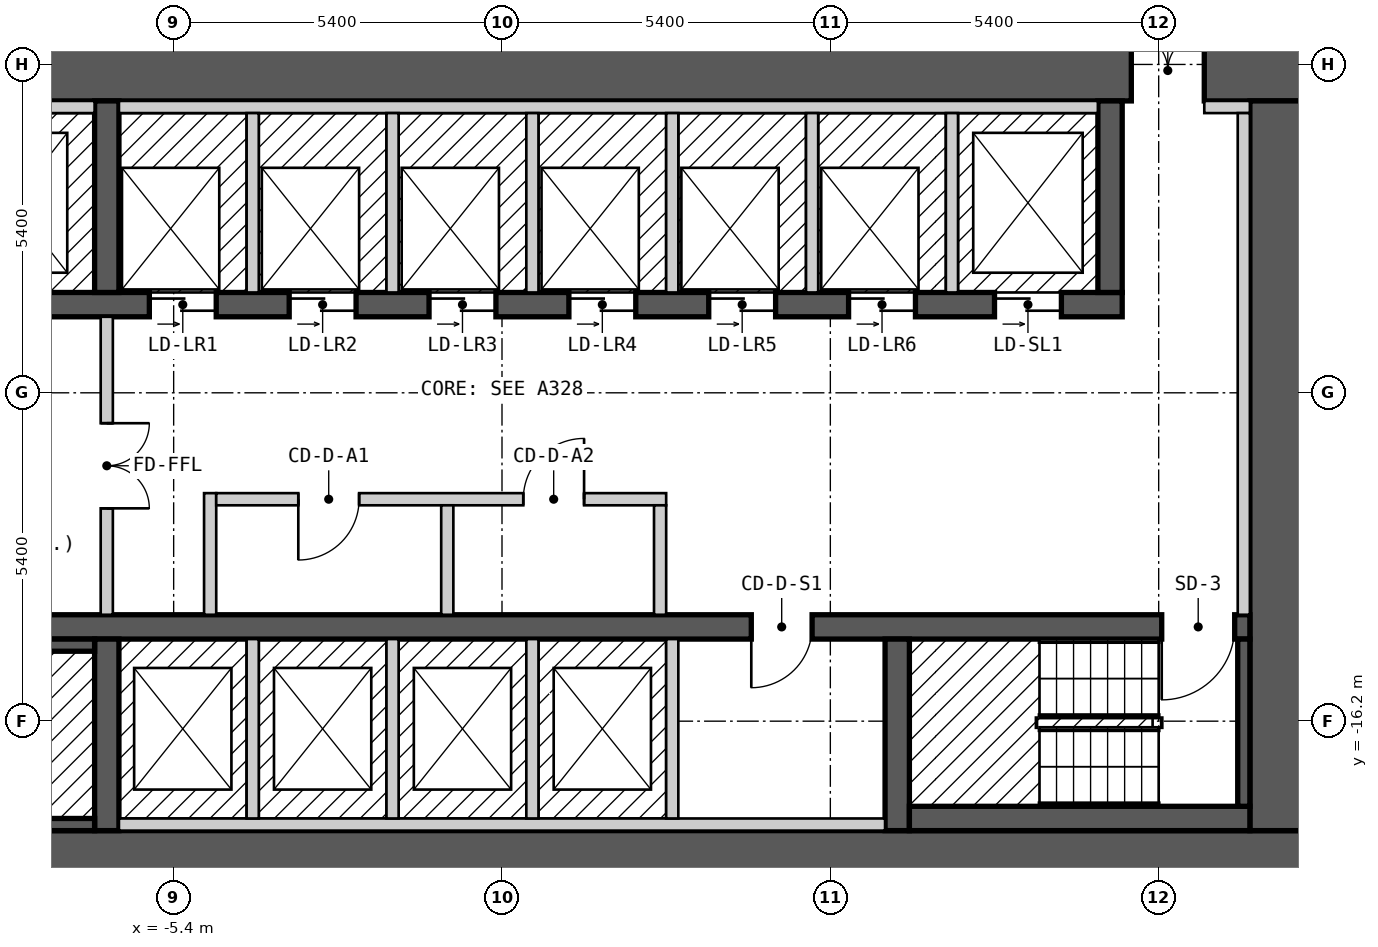
"""IFC4 building model, lengths in metres.
Left out: names, types, materials, properties, quantities, classifications, styles, units other than length and angle.
Written with IfcOpenShell. Run it as: python <this file> out.ifc"""

import sys

from ifc_helpers import new_model, si_unit, direction, frame, frame_2d, origin, place, context, subcontext, project, spatial, rectangle, extrude, element, fill, save


model = new_model("IFC4")
c1 = context("Model", 3, precision=1e-05, world=origin(), true_north=direction((0.0, 1.0)))
c2 = subcontext(c1, "Body", "Model", "MODEL_VIEW")
j1 = project(units=[si_unit("LENGTHUNIT", "METRE"), si_unit("PLANEANGLEUNIT", "RADIAN")], contexts=[c1])
p1 = place(None, origin())
s1 = spatial("IfcSite", under=j1, at=p1, CompositionType="ELEMENT")
p2 = place(p1, origin())
s2 = spatial("IfcBuilding", under=s1, at=p2, CompositionType="ELEMENT")
p3 = place(p2, frame((0.0, 0.0, 99.0)))
s3 = spatial("IfcBuildingStorey", under=s2, at=p3, CompositionType="ELEMENT", Elevation=99.0)
p4 = place(p3, frame((-13.3, -18.5, 0.0), z_axis=(0.0, 0.0, 1.0), x_axis=(1.0, 0.0, 0.0)))
e1 = element("IfcWall", 1, at=p4, inside=s3, PredefinedType="SHEAR", context=c2, shape_type="SweptSolid", body=[
    extrude(rectangle(XDim=26.6, YDim=1.0, at=frame_2d((13.3, 0.0))), origin(), (0.0, 0.0, 1.0), 2.7),
])
p5 = place(p3, frame((-13.3, -5.5, 0.0), z_axis=(0.0, 0.0, 1.0), x_axis=(1.0, 0.0, 0.0)))
e2 = element("IfcWall", 2, at=p5, inside=s3, PredefinedType="SHEAR", context=c2, shape_type="SweptSolid", body=[
    extrude(rectangle(XDim=26.6, YDim=1.0, at=frame_2d((13.3, 0.0))), origin(), (0.0, 0.0, 1.0), 2.7),
])
p6 = place(p5, frame((23.65, 0.0, 0.0)))
e3 = element("IfcOpeningElement", 3, at=p6, cuts=e2, PredefinedType="OPENING", context=c2, shape_type="SweptSolid", body=[
    extrude(rectangle(XDim=1.2, YDim=2.1, at=frame_2d((0.6, 1.05))), frame((0.0, 0.51, 0.0), z_axis=(0.0, -1.0, 0.0), x_axis=(1.0, 0.0, 0.0)), (0.0, 0.0, 1.0), 1.02),
])
p7 = place(p3, frame((12.8, -18.0, 0.0), z_axis=(0.0, 0.0, 1.0), x_axis=(0.0, 1.0, 0.0)))
e4 = element("IfcWall", 4, at=p7, inside=s3, PredefinedType="SHEAR", context=c2, shape_type="SweptSolid", body=[
    extrude(rectangle(XDim=12.0, YDim=1.0, at=frame_2d((6.0, 0.0))), origin(), (0.0, 0.0, 1.0), 2.7),
])
p8 = place(p3, frame((-12.3, -14.65, 0.0), z_axis=(0.0, 0.0, 1.0), x_axis=(1.0, 0.0, 0.0)))
e5 = element("IfcWall", 5, at=p8, inside=s3, PredefinedType="SHEAR", context=c2, shape_type="SweptSolid", body=[
    extrude(rectangle(XDim=24.6, YDim=0.4, at=frame_2d((12.3, 0.0))), origin(), (0.0, 0.0, 1.0), 2.7),
])
p9 = place(p8, frame((1.5, 0.0, 0.0), z_axis=(0.0, 0.0, 1.0), x_axis=(-1.0, 0.0, 0.0)))
e6 = element("IfcOpeningElement", 6, at=p9, cuts=e5, PredefinedType="OPENING", context=c2, shape_type="SweptSolid", body=[
    extrude(rectangle(XDim=1.2, YDim=2.1, at=frame_2d((0.6, 1.05))), frame((0.0, 0.21, 0.0), z_axis=(0.0, -1.0, 0.0), x_axis=(1.0, 0.0, 0.0)), (0.0, 0.0, 1.0), 0.42),
])
p10 = place(p8, frame((24.35, 0.0, 0.0), z_axis=(0.0, 0.0, 1.0), x_axis=(-1.0, 0.0, 0.0)))
e7 = element("IfcOpeningElement", 7, at=p10, cuts=e5, PredefinedType="OPENING", context=c2, shape_type="SweptSolid", body=[
    extrude(rectangle(XDim=1.2, YDim=2.1, at=frame_2d((0.6, 1.05))), frame((0.0, 0.21, 0.0), z_axis=(0.0, -1.0, 0.0), x_axis=(1.0, 0.0, 0.0)), (0.0, 0.0, 1.0), 0.42),
])
p11 = place(p8, frame((17.4, 0.0, 0.0), z_axis=(0.0, 0.0, 1.0), x_axis=(-1.0, 0.0, 0.0)))
e8 = element("IfcOpeningElement", 8, at=p11, cuts=e5, PredefinedType="OPENING", context=c2, shape_type="SweptSolid", body=[
    extrude(rectangle(XDim=1.0, YDim=2.1, at=frame_2d((0.5, 1.05))), frame((0.0, 0.21, 0.0), z_axis=(0.0, -1.0, 0.0), x_axis=(1.0, 0.0, 0.0)), (0.0, 0.0, 1.0), 0.42),
])
p12 = place(p3, frame((-12.3, -9.35, 0.0), z_axis=(0.0, 0.0, 1.0), x_axis=(1.0, 0.0, 0.0)))
e9 = element("IfcWall", 9, at=p12, inside=s3, PredefinedType="SHEAR", context=c2, shape_type="SweptSolid", body=[
    extrude(rectangle(XDim=22.5, YDim=0.4, at=frame_2d((11.25, 0.0))), origin(), (0.0, 0.0, 1.0), 2.7),
])
p13 = place(p12, frame((0.9, 0.0, 0.0)))
e10 = element("IfcOpeningElement", 10, at=p13, cuts=e9, PredefinedType="OPENING", context=c2, shape_type="SweptSolid", body=[
    extrude(rectangle(XDim=1.1, YDim=2.1, at=frame_2d((0.55, 1.05))), frame((0.0, 0.21, 0.0), z_axis=(0.0, -1.0, 0.0), x_axis=(1.0, 0.0, 0.0)), (0.0, 0.0, 1.0), 0.42),
])
p14 = place(p12, frame((3.7, 0.0, 0.0)))
e11 = element("IfcOpeningElement", 11, at=p14, cuts=e9, PredefinedType="OPENING", context=c2, shape_type="SweptSolid", body=[
    extrude(rectangle(XDim=1.1, YDim=2.1, at=frame_2d((0.55, 1.05))), frame((0.0, 0.21, 0.0), z_axis=(0.0, -1.0, 0.0), x_axis=(1.0, 0.0, 0.0)), (0.0, 0.0, 1.0), 0.42),
])
p15 = place(p12, frame((6.5, 0.0, 0.0)))
e12 = element("IfcOpeningElement", 12, at=p15, cuts=e9, PredefinedType="OPENING", context=c2, shape_type="SweptSolid", body=[
    extrude(rectangle(XDim=1.1, YDim=2.1, at=frame_2d((0.55, 1.05))), frame((0.0, 0.21, 0.0), z_axis=(0.0, -1.0, 0.0), x_axis=(1.0, 0.0, 0.0)), (0.0, 0.0, 1.0), 0.42),
])
p16 = place(p12, frame((8.8, 0.0, 0.0)))
e13 = element("IfcOpeningElement", 13, at=p16, cuts=e9, PredefinedType="OPENING", context=c2, shape_type="SweptSolid", body=[
    extrude(rectangle(XDim=1.1, YDim=2.1, at=frame_2d((0.55, 1.05))), frame((0.0, 0.21, 0.0), z_axis=(0.0, -1.0, 0.0), x_axis=(1.0, 0.0, 0.0)), (0.0, 0.0, 1.0), 0.42),
])
p17 = place(p12, frame((11.1, 0.0, 0.0)))
e14 = element("IfcOpeningElement", 14, at=p17, cuts=e9, PredefinedType="OPENING", context=c2, shape_type="SweptSolid", body=[
    extrude(rectangle(XDim=1.1, YDim=2.1, at=frame_2d((0.55, 1.05))), frame((0.0, 0.21, 0.0), z_axis=(0.0, -1.0, 0.0), x_axis=(1.0, 0.0, 0.0)), (0.0, 0.0, 1.0), 0.42),
])
p18 = place(p12, frame((13.4, 0.0, 0.0)))
e15 = element("IfcOpeningElement", 15, at=p18, cuts=e9, PredefinedType="OPENING", context=c2, shape_type="SweptSolid", body=[
    extrude(rectangle(XDim=1.1, YDim=2.1, at=frame_2d((0.55, 1.05))), frame((0.0, 0.21, 0.0), z_axis=(0.0, -1.0, 0.0), x_axis=(1.0, 0.0, 0.0)), (0.0, 0.0, 1.0), 0.42),
])
p19 = place(p12, frame((15.7, 0.0, 0.0)))
e16 = element("IfcOpeningElement", 16, at=p19, cuts=e9, PredefinedType="OPENING", context=c2, shape_type="SweptSolid", body=[
    extrude(rectangle(XDim=1.1, YDim=2.1, at=frame_2d((0.55, 1.05))), frame((0.0, 0.21, 0.0), z_axis=(0.0, -1.0, 0.0), x_axis=(1.0, 0.0, 0.0)), (0.0, 0.0, 1.0), 0.42),
])
p20 = place(p12, frame((18.0, 0.0, 0.0)))
e17 = element("IfcOpeningElement", 17, at=p20, cuts=e9, PredefinedType="OPENING", context=c2, shape_type="SweptSolid", body=[
    extrude(rectangle(XDim=1.1, YDim=2.1, at=frame_2d((0.55, 1.05))), frame((0.0, 0.21, 0.0), z_axis=(0.0, -1.0, 0.0), x_axis=(1.0, 0.0, 0.0)), (0.0, 0.0, 1.0), 0.42),
])
p21 = place(p12, frame((20.4, 0.0, 0.0)))
e18 = element("IfcOpeningElement", 18, at=p21, cuts=e9, PredefinedType="OPENING", context=c2, shape_type="SweptSolid", body=[
    extrude(rectangle(XDim=1.1, YDim=2.1, at=frame_2d((0.55, 1.05))), frame((0.0, 0.21, 0.0), z_axis=(0.0, -1.0, 0.0), x_axis=(1.0, 0.0, 0.0)), (0.0, 0.0, 1.0), 0.42),
])
for number, where, z_axis, x_axis in (
    (19, (-6.5, -18.0, 0.0), (0.0, 0.0, 1.0), (0.0, 1.0, 0.0)),
    (20, (6.5, -18.0, 0.0), (0.0, 0.0, 1.0), (0.0, 1.0, 0.0)),
    (21, (-6.5, -9.15, 0.0), (0.0, 0.0, 1.0), (0.0, 1.0, 0.0)),
    (22, (10.0, -9.15, 0.0), (0.0, 0.0, 1.0), (0.0, 1.0, 0.0)),
):
    element("IfcWall", number, at=place(p3, frame(where, z_axis=z_axis, x_axis=x_axis)), inside=s3, PredefinedType="SHEAR", context=c2, shape_type="SweptSolid", body=[
        extrude(rectangle(XDim=3.15, YDim=0.4, at=frame_2d((1.575, 0.0))), origin(), (0.0, 0.0, 1.0), 2.7),
    ])
for number, where, z_axis, x_axis in (
    (23, (-12.1, -17.9, 0.0), (0.0, 0.0, 1.0), (1.0, 0.0, 0.0)),
    (24, (-12.1, -6.1, 0.0), (0.0, 0.0, 1.0), (1.0, 0.0, 0.0)),
):
    element("IfcWall", number, at=place(p3, frame(where, z_axis=z_axis, x_axis=x_axis)), inside=s3, PredefinedType="SOLIDWALL", context=c2, shape_type="SweptSolid", body=[
        extrude(rectangle(XDim=5.4, YDim=0.2, at=frame_2d((2.7, 0.0))), origin(), (0.0, 0.0, 1.0), 2.7),
    ])
p22 = place(p3, frame((-10.8, -14.95, 0.0), z_axis=(0.0, 0.0, 1.0), x_axis=(1.0, 0.0, 0.0)))
e25 = element("IfcWall", 25, at=p22, inside=s3, PredefinedType="SOLIDWALL", context=c2, shape_type="SweptSolid", body=[
    extrude(rectangle(XDim=4.1, YDim=0.2, at=frame_2d((2.05, 0.0))), origin(), (0.0, 0.0, 1.0), 2.7),
])
p23 = place(p3, frame((-6.5, -14.45, 0.0), z_axis=(0.0, 0.0, 1.0), x_axis=(0.0, 1.0, 0.0)))
e26 = element("IfcWall", 26, at=p23, inside=s3, PredefinedType="PARTITIONING", context=c2, shape_type="SweptSolid", body=[
    extrude(rectangle(XDim=4.9, YDim=0.2, at=frame_2d((2.45, 0.0))), origin(), (0.0, 0.0, 1.0), 2.7),
])
p24 = place(p23, frame((3.15, 0.0, 0.0), z_axis=(0.0, 0.0, 1.0), x_axis=(-1.0, 0.0, 0.0)))
e27 = element("IfcOpeningElement", 27, at=p24, cuts=e26, PredefinedType="OPENING", context=c2, shape_type="SweptSolid", body=[
    extrude(rectangle(XDim=1.4, YDim=2.1, at=frame_2d((0.7, 1.05))), frame((0.0, 0.11, 0.0), z_axis=(0.0, -1.0, 0.0), x_axis=(1.0, 0.0, 0.0)), (0.0, 0.0, 1.0), 0.22),
])
p25 = place(p3, frame((-6.3, -17.9, 0.0), z_axis=(0.0, 0.0, 1.0), x_axis=(1.0, 0.0, 0.0)))
e28 = element("IfcWall", 28, at=p25, inside=s3, PredefinedType="SOLIDWALL", context=c2, shape_type="SweptSolid", body=[
    extrude(rectangle(XDim=12.6, YDim=0.2, at=frame_2d((6.3, 0.0))), origin(), (0.0, 0.0, 1.0), 2.7),
])
p26 = place(p3, frame((-6.3, -6.1, 0.0), z_axis=(0.0, 0.0, 1.0), x_axis=(1.0, 0.0, 0.0)))
e29 = element("IfcWall", 29, at=p26, inside=s3, PredefinedType="SOLIDWALL", context=c2, shape_type="SweptSolid", body=[
    extrude(rectangle(XDim=16.1, YDim=0.2, at=frame_2d((8.05, 0.0))), origin(), (0.0, 0.0, 1.0), 2.7),
])
p27 = place(p3, frame((-4.8, -14.45, 0.0), z_axis=(0.0, 0.0, 1.0), x_axis=(0.0, 1.0, 0.0)))
e30 = element("IfcWall", 30, at=p27, inside=s3, PredefinedType="PARTITIONING", context=c2, shape_type="SweptSolid", body=[
    extrude(rectangle(XDim=2.0, YDim=0.2, at=frame_2d((1.0, 0.0))), origin(), (0.0, 0.0, 1.0), 2.7),
])
p28 = place(p3, frame((-4.7, -12.55, 0.0), z_axis=(0.0, 0.0, 1.0), x_axis=(1.0, 0.0, 0.0)))
e31 = element("IfcWall", 31, at=p28, inside=s3, PredefinedType="PARTITIONING", context=c2, shape_type="SweptSolid", body=[
    extrude(rectangle(XDim=7.4, YDim=0.2, at=frame_2d((3.7, 0.0))), origin(), (0.0, 0.0, 1.0), 2.7),
])
p29 = place(p28, frame((2.35, 0.0, 0.0), z_axis=(0.0, 0.0, 1.0), x_axis=(-1.0, 0.0, 0.0)))
e32 = element("IfcOpeningElement", 32, at=p29, cuts=e31, PredefinedType="OPENING", context=c2, shape_type="SweptSolid", body=[
    extrude(rectangle(XDim=1.0, YDim=2.1, at=frame_2d((0.5, 1.05))), frame((0.0, 0.11, 0.0), z_axis=(0.0, -1.0, 0.0), x_axis=(1.0, 0.0, 0.0)), (0.0, 0.0, 1.0), 0.22),
])
p30 = place(p28, frame((6.05, 0.0, 0.0), z_axis=(0.0, 0.0, 1.0), x_axis=(-1.0, 0.0, 0.0)))
e33 = element("IfcOpeningElement", 33, at=p30, cuts=e31, PredefinedType="OPENING", context=c2, shape_type="SweptSolid", body=[
    extrude(rectangle(XDim=1.0, YDim=2.1, at=frame_2d((0.5, 1.05))), frame((0.0, 0.11, 0.0), z_axis=(0.0, -1.0, 0.0), x_axis=(1.0, 0.0, 0.0)), (0.0, 0.0, 1.0), 0.22),
])
for number, where, z_axis, x_axis in (
    (34, (-4.1, -17.8, 0.0), (0.0, 0.0, 1.0), (0.0, 1.0, 0.0)),
    (35, (-4.1, -9.15, 0.0), (0.0, 0.0, 1.0), (0.0, 1.0, 0.0)),
    (36, (-1.8, -17.8, 0.0), (0.0, 0.0, 1.0), (0.0, 1.0, 0.0)),
    (37, (-1.8, -9.15, 0.0), (0.0, 0.0, 1.0), (0.0, 1.0, 0.0)),
):
    element("IfcWall", number, at=place(p3, frame(where, z_axis=z_axis, x_axis=x_axis)), inside=s3, PredefinedType="SOLIDWALL", context=c2, shape_type="SweptSolid", body=[
        extrude(rectangle(XDim=2.95, YDim=0.2, at=frame_2d((1.475, 0.0))), origin(), (0.0, 0.0, 1.0), 2.7),
    ])
p31 = place(p3, frame((-0.9, -14.45, 0.0), z_axis=(0.0, 0.0, 1.0), x_axis=(0.0, 1.0, 0.0)))
e38 = element("IfcWall", 38, at=p31, inside=s3, PredefinedType="PARTITIONING", context=c2, shape_type="SweptSolid", body=[
    extrude(rectangle(XDim=1.8, YDim=0.2, at=frame_2d((0.9, 0.0))), origin(), (0.0, 0.0, 1.0), 2.7),
])
for number, where, z_axis, x_axis in (
    (39, (0.5, -17.8, 0.0), (0.0, 0.0, 1.0), (0.0, 1.0, 0.0)),
    (40, (0.5, -9.15, 0.0), (0.0, 0.0, 1.0), (0.0, 1.0, 0.0)),
):
    element("IfcWall", number, at=place(p3, frame(where, z_axis=z_axis, x_axis=x_axis)), inside=s3, PredefinedType="SOLIDWALL", context=c2, shape_type="SweptSolid", body=[
        extrude(rectangle(XDim=2.95, YDim=0.2, at=frame_2d((1.475, 0.0))), origin(), (0.0, 0.0, 1.0), 2.7),
    ])
p32 = place(p3, frame((2.6, -14.45, 0.0), z_axis=(0.0, 0.0, 1.0), x_axis=(0.0, 1.0, 0.0)))
e41 = element("IfcWall", 41, at=p32, inside=s3, PredefinedType="PARTITIONING", context=c2, shape_type="SweptSolid", body=[
    extrude(rectangle(XDim=1.8, YDim=0.2, at=frame_2d((0.9, 0.0))), origin(), (0.0, 0.0, 1.0), 2.7),
])
for number, where, z_axis, x_axis in (
    (42, (2.8, -17.8, 0.0), (0.0, 0.0, 1.0), (0.0, 1.0, 0.0)),
    (43, (2.8, -9.15, 0.0), (0.0, 0.0, 1.0), (0.0, 1.0, 0.0)),
    (44, (5.1, -9.15, 0.0), (0.0, 0.0, 1.0), (0.0, 1.0, 0.0)),
):
    element("IfcWall", number, at=place(p3, frame(where, z_axis=z_axis, x_axis=x_axis)), inside=s3, PredefinedType="SOLIDWALL", context=c2, shape_type="SweptSolid", body=[
        extrude(rectangle(XDim=2.95, YDim=0.2, at=frame_2d((1.475, 0.0))), origin(), (0.0, 0.0, 1.0), 2.7),
    ])
p33 = place(p3, frame((6.7, -17.8, 0.0), z_axis=(0.0, 0.0, 1.0), x_axis=(1.0, 0.0, 0.0)))
e45 = element("IfcWall", 45, at=p33, inside=s3, PredefinedType="SOLIDWALL", context=c2, shape_type="SweptSolid", body=[
    extrude(rectangle(XDim=5.6, YDim=0.4, at=frame_2d((2.8, 0.0))), origin(), (0.0, 0.0, 1.0), 2.7),
])
p34 = place(p3, frame((7.4, -9.15, 0.0), z_axis=(0.0, 0.0, 1.0), x_axis=(0.0, 1.0, 0.0)))
e46 = element("IfcWall", 46, at=p34, inside=s3, PredefinedType="SOLIDWALL", context=c2, shape_type="SweptSolid", body=[
    extrude(rectangle(XDim=2.95, YDim=0.2, at=frame_2d((1.475, 0.0))), origin(), (0.0, 0.0, 1.0), 2.7),
])
p35 = place(p3, frame((11.55, -6.1, 0.0), z_axis=(0.0, 0.0, 1.0), x_axis=(1.0, 0.0, 0.0)))
e47 = element("IfcWall", 47, at=p35, inside=s3, PredefinedType="PARTITIONING", context=c2, shape_type="SweptSolid", body=[
    extrude(rectangle(XDim=0.75, YDim=0.2, at=frame_2d((0.375, 0.0))), origin(), (0.0, 0.0, 1.0), 2.7),
])
p36 = place(p3, frame((12.2, -17.6, 0.0), z_axis=(0.0, 0.0, 1.0), x_axis=(0.0, 1.0, 0.0)))
e48 = element("IfcWall", 48, at=p36, inside=s3, PredefinedType="SOLIDWALL", context=c2, shape_type="SweptSolid", body=[
    extrude(rectangle(XDim=2.75, YDim=0.2, at=frame_2d((1.375, 0.0))), origin(), (0.0, 0.0, 1.0), 2.7),
])
p37 = place(p3, frame((12.2, -14.45, 0.0), z_axis=(0.0, 0.0, 1.0), x_axis=(0.0, 1.0, 0.0)))
e49 = element("IfcWall", 49, at=p37, inside=s3, PredefinedType="PARTITIONING", context=c2, shape_type="SweptSolid", body=[
    extrude(rectangle(XDim=8.25, YDim=0.2, at=frame_2d((4.125, 0.0))), origin(), (0.0, 0.0, 1.0), 2.7),
])
p38 = place(p15, origin())
e50 = element("IfcDoor", 50, at=p38, inside=s3, OperationType="DOUBLE_DOOR_SLIDING", PredefinedType="DOOR", context=c2, shape_type="SweptSolid", body=[
    extrude(rectangle(XDim=1.1, YDim=2.1, at=frame_2d((0.55, 1.05))), frame((0.0, 0.025, 0.0), z_axis=(0.0, -1.0, 0.0), x_axis=(1.0, 0.0, 0.0)), (0.0, 0.0, 1.0), 0.05),
])
fill(e12, e50)
p39 = place(p16, origin())
e51 = element("IfcDoor", 51, at=p39, inside=s3, OperationType="DOUBLE_DOOR_SLIDING", PredefinedType="DOOR", context=c2, shape_type="SweptSolid", body=[
    extrude(rectangle(XDim=1.1, YDim=2.1, at=frame_2d((0.55, 1.05))), frame((0.0, 0.025, 0.0), z_axis=(0.0, -1.0, 0.0), x_axis=(1.0, 0.0, 0.0)), (0.0, 0.0, 1.0), 0.05),
])
fill(e13, e51)
p40 = place(p17, origin())
e52 = element("IfcDoor", 52, at=p40, inside=s3, OperationType="DOUBLE_DOOR_SLIDING", PredefinedType="DOOR", context=c2, shape_type="SweptSolid", body=[
    extrude(rectangle(XDim=1.1, YDim=2.1, at=frame_2d((0.55, 1.05))), frame((0.0, 0.025, 0.0), z_axis=(0.0, -1.0, 0.0), x_axis=(1.0, 0.0, 0.0)), (0.0, 0.0, 1.0), 0.05),
])
fill(e14, e52)
p41 = place(p18, origin())
e53 = element("IfcDoor", 53, at=p41, inside=s3, OperationType="DOUBLE_DOOR_SLIDING", PredefinedType="DOOR", context=c2, shape_type="SweptSolid", body=[
    extrude(rectangle(XDim=1.1, YDim=2.1, at=frame_2d((0.55, 1.05))), frame((0.0, 0.025, 0.0), z_axis=(0.0, -1.0, 0.0), x_axis=(1.0, 0.0, 0.0)), (0.0, 0.0, 1.0), 0.05),
])
fill(e15, e53)
p42 = place(p19, origin())
e54 = element("IfcDoor", 54, at=p42, inside=s3, OperationType="DOUBLE_DOOR_SLIDING", PredefinedType="DOOR", context=c2, shape_type="SweptSolid", body=[
    extrude(rectangle(XDim=1.1, YDim=2.1, at=frame_2d((0.55, 1.05))), frame((0.0, 0.025, 0.0), z_axis=(0.0, -1.0, 0.0), x_axis=(1.0, 0.0, 0.0)), (0.0, 0.0, 1.0), 0.05),
])
fill(e16, e54)
p43 = place(p20, origin())
e55 = element("IfcDoor", 55, at=p43, inside=s3, OperationType="DOUBLE_DOOR_SLIDING", PredefinedType="DOOR", context=c2, shape_type="SweptSolid", body=[
    extrude(rectangle(XDim=1.1, YDim=2.1, at=frame_2d((0.55, 1.05))), frame((0.0, 0.025, 0.0), z_axis=(0.0, -1.0, 0.0), x_axis=(1.0, 0.0, 0.0)), (0.0, 0.0, 1.0), 0.05),
])
fill(e17, e55)
p44 = place(p21, origin())
e56 = element("IfcDoor", 56, at=p44, inside=s3, OperationType="DOUBLE_DOOR_SLIDING", PredefinedType="DOOR", context=c2, shape_type="SweptSolid", body=[
    extrude(rectangle(XDim=1.1, YDim=2.1, at=frame_2d((0.55, 1.05))), frame((0.0, 0.025, 0.0), z_axis=(0.0, -1.0, 0.0), x_axis=(1.0, 0.0, 0.0)), (0.0, 0.0, 1.0), 0.05),
])
fill(e18, e56)
p45 = place(p10, origin())
e57 = element("IfcDoor", 57, at=p45, inside=s3, OperationType="SINGLE_SWING_RIGHT", PredefinedType="DOOR", context=c2, shape_type="SweptSolid", body=[
    extrude(rectangle(XDim=1.2, YDim=2.1, at=frame_2d((0.6, 1.05))), frame((0.0, 0.025, 0.0), z_axis=(0.0, -1.0, 0.0), x_axis=(1.0, 0.0, 0.0)), (0.0, 0.0, 1.0), 0.05),
])
fill(e7, e57)
p46 = place(p24, origin())
e58 = element("IfcDoor", 58, at=p46, inside=s3, OperationType="DOUBLE_DOOR_SINGLE_SWING", PredefinedType="DOOR", context=c2, shape_type="SweptSolid", body=[
    extrude(rectangle(XDim=1.4, YDim=2.1, at=frame_2d((0.7, 1.05))), frame((0.0, 0.025, 0.0), z_axis=(0.0, -1.0, 0.0), x_axis=(1.0, 0.0, 0.0)), (0.0, 0.0, 1.0), 0.05),
])
fill(e27, e58)
p47 = place(p6, origin())
e59 = element("IfcDoor", 59, at=p47, inside=s3, OperationType="DOUBLE_DOOR_SINGLE_SWING", PredefinedType="DOOR", context=c2, shape_type="SweptSolid", body=[
    extrude(rectangle(XDim=1.2, YDim=2.1, at=frame_2d((0.6, 1.05))), frame((0.0, 0.025, 0.0), z_axis=(0.0, -1.0, 0.0), x_axis=(1.0, 0.0, 0.0)), (0.0, 0.0, 1.0), 0.05),
])
fill(e3, e59)
p48 = place(p29, origin())
e60 = element("IfcDoor", 60, at=p48, inside=s3, OperationType="SINGLE_SWING_RIGHT", PredefinedType="DOOR", context=c2, shape_type="SweptSolid", body=[
    extrude(rectangle(XDim=1.0, YDim=2.1, at=frame_2d((0.5, 1.05))), frame((0.0, 0.025, 0.0), z_axis=(0.0, -1.0, 0.0), x_axis=(1.0, 0.0, 0.0)), (0.0, 0.0, 1.0), 0.05),
])
fill(e32, e60)
p49 = place(p30, origin())
e61 = element("IfcDoor", 61, at=p49, inside=s3, OperationType="SINGLE_SWING_LEFT", PredefinedType="DOOR", context=c2, shape_type="SweptSolid", body=[
    extrude(rectangle(XDim=1.0, YDim=2.1, at=frame_2d((0.5, 1.05))), frame((0.0, 0.025, 0.0), z_axis=(0.0, -1.0, 0.0), x_axis=(1.0, 0.0, 0.0)), (0.0, 0.0, 1.0), 0.05),
])
fill(e33, e61)
p50 = place(p11, origin())
e62 = element("IfcDoor", 62, at=p50, inside=s3, OperationType="SINGLE_SWING_RIGHT", PredefinedType="DOOR", context=c2, shape_type="SweptSolid", body=[
    extrude(rectangle(XDim=1.0, YDim=2.1, at=frame_2d((0.5, 1.05))), frame((0.0, 0.025, 0.0), z_axis=(0.0, -1.0, 0.0), x_axis=(1.0, 0.0, 0.0)), (0.0, 0.0, 1.0), 0.05),
])
fill(e8, e62)
save(model, sys.argv[1])
